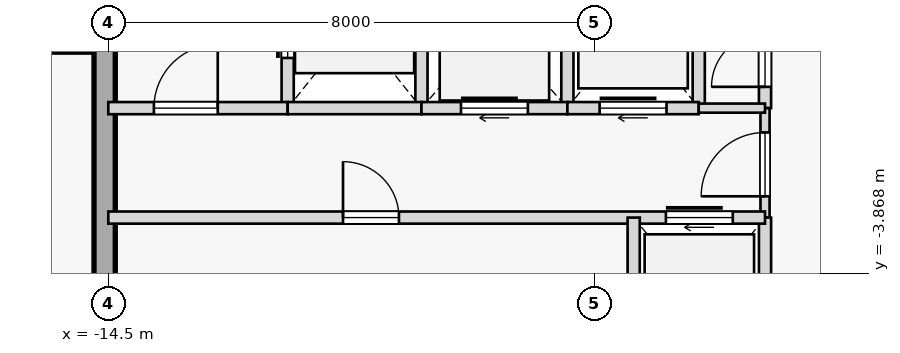
"""IFC4 building model, lengths in metres.
Left out: names, types, materials, properties, quantities, classifications, styles, units other than length and angle.
Written with IfcOpenShell. Run it as: python <this file> out.ifc"""

import sys

from ifc_helpers import new_model, si_unit, direction, frame, frame_2d, origin, place, context, subcontext, project, spatial, rectangle, extrude, element, fill, save


model = new_model("IFC4")
c1 = context("Model", 3, precision=1e-05, world=origin(), true_north=direction((0.0, 1.0)))
c2 = subcontext(c1, "Body", "Model", "MODEL_VIEW")
j1 = project(units=[si_unit("LENGTHUNIT", "METRE"), si_unit("PLANEANGLEUNIT", "RADIAN")], contexts=[c1])
p1 = place(None, origin())
s1 = spatial("IfcSite", under=j1, at=p1, CompositionType="ELEMENT")
p2 = place(p1, origin())
s2 = spatial("IfcBuilding", under=s1, at=p2, CompositionType="ELEMENT")
p3 = place(p2, frame((0.0, 0.0, 268.9)))
s3 = spatial("IfcBuildingStorey", under=s2, at=p3, CompositionType="ELEMENT", Elevation=268.9)
p4 = place(p3, frame((-14.56, -5.425, 0.0), z_axis=(0.0, 0.0, 1.0), x_axis=(0.0, 1.0, 0.0)))
e1 = element("IfcWall", 1, at=p4, inside=s3, PredefinedType="SHEAR", context=c2, shape_type="SweptSolid", body=[
    extrude(rectangle(XDim=10.85, YDim=0.35, at=frame_2d((5.425, 0.0))), origin(), (0.0, 0.0, 1.0), 3.125),
])
p5 = place(p3, frame((-3.7, -1.15, 0.0), z_axis=(0.0, 0.0, 1.0), x_axis=(0.0, 1.0, 0.0)))
e2 = element("IfcWall", 2, at=p5, inside=s3, PredefinedType="STANDARD", context=c2, shape_type="SweptSolid", body=[
    extrude(rectangle(XDim=6.75, YDim=0.2, at=frame_2d((3.375, 0.0))), origin(), (0.0, 0.0, 1.0), 3.125),
])
p6 = place(p5, frame((0.35, 0.0, 0.0)))
e3 = element("IfcOpeningElement", 3, at=p6, cuts=e2, PredefinedType="OPENING", context=c2, shape_type="SweptSolid", body=[
    extrude(rectangle(XDim=0.88, YDim=2.15, at=frame_2d((0.44, 1.075))), frame((0.0, 0.11, 0.0), z_axis=(0.0, -1.0, 0.0), x_axis=(1.0, 0.0, 0.0)), (0.0, 0.0, 1.0), 0.22),
])
p7 = place(p5, frame((2.55, 0.0, 0.0)))
e4 = element("IfcOpeningElement", 4, at=p7, cuts=e2, PredefinedType="OPENING", context=c2, shape_type="SweptSolid", body=[
    extrude(rectangle(XDim=0.92, YDim=2.15, at=frame_2d((0.46, 1.075))), frame((0.0, 0.11, 0.0), z_axis=(0.0, -1.0, 0.0), x_axis=(1.0, 0.0, 0.0)), (0.0, 0.0, 1.0), 0.22),
])
p8 = place(p5, frame((4.22, 0.0, 0.0)))
e5 = element("IfcOpeningElement", 5, at=p8, cuts=e2, PredefinedType="OPENING", context=c2, shape_type="SweptSolid", body=[
    extrude(rectangle(XDim=0.88, YDim=2.15, at=frame_2d((0.44, 1.075))), frame((0.0, 0.11, 0.0), z_axis=(0.0, -1.0, 0.0), x_axis=(1.0, 0.0, 0.0)), (0.0, 0.0, 1.0), 0.22),
])
p9 = place(p3, frame((-3.7, -2.95, 0.0), z_axis=(0.0, 0.0, 1.0), x_axis=(0.0, 1.0, 0.0)))
e6 = element("IfcWall", 6, at=p9, inside=s3, PredefinedType="PARTITIONING", context=c2, shape_type="SweptSolid", body=[
    extrude(rectangle(XDim=1.8, YDim=0.15, at=frame_2d((0.9, 0.0))), origin(), (0.0, 0.0, 1.0), 3.125),
])
p10 = place(p9, frame((0.35, 0.0, 0.0)))
e7 = element("IfcOpeningElement", 7, at=p10, cuts=e6, PredefinedType="OPENING", context=c2, shape_type="SweptSolid", body=[
    extrude(rectangle(XDim=1.05, YDim=2.18, at=frame_2d((0.525, 1.09))), frame((0.0, 0.085, 0.0), z_axis=(0.0, -1.0, 0.0), x_axis=(1.0, 0.0, 0.0)), (0.0, 0.0, 1.0), 0.17),
])
p11 = place(p3, frame((-3.7, -5.6, 0.0), z_axis=(0.0, 0.0, 1.0), x_axis=(0.0, 1.0, 0.0)))
e8 = element("IfcWall", 8, at=p11, inside=s3, PredefinedType="STANDARD", context=c2, shape_type="SweptSolid", body=[
    extrude(rectangle(XDim=2.65, YDim=0.2, at=frame_2d((1.325, 0.0))), origin(), (0.0, 0.0, 1.0), 3.125),
])
p12 = place(p3, frame((-11.55, -1.15, 0.0), z_axis=(0.0, 0.0, 1.0), x_axis=(0.0, 1.0, 0.0)))
e9 = element("IfcWall", 9, at=p12, inside=s3, PredefinedType="STANDARD", context=c2, shape_type="SweptSolid", body=[
    extrude(rectangle(XDim=2.75, YDim=0.2, at=frame_2d((1.375, 0.0))), origin(), (0.0, 0.0, 1.0), 3.125),
])
p13 = place(p12, frame((0.825, 0.0, 0.0)))
e10 = element("IfcOpeningElement", 10, at=p13, cuts=e9, PredefinedType="OPENING", context=c2, shape_type="SweptSolid", body=[
    extrude(rectangle(XDim=1.1, YDim=2.15, at=frame_2d((0.55, 1.075))), frame((0.0, 0.11, 0.0), z_axis=(0.0, -1.0, 0.0), x_axis=(1.0, 0.0, 0.0)), (0.0, 0.0, 1.0), 0.22),
])
p14 = place(p3, frame((-9.35, -1.15, 0.0), z_axis=(0.0, 0.0, 1.0), x_axis=(0.0, 1.0, 0.0)))
e11 = element("IfcWall", 11, at=p14, inside=s3, PredefinedType="STANDARD", context=c2, shape_type="SweptSolid", body=[
    extrude(rectangle(XDim=2.75, YDim=0.2, at=frame_2d((1.375, 0.0))), origin(), (0.0, 0.0, 1.0), 3.125),
])
p15 = place(p3, frame((-14.5, -1.15, 0.0), z_axis=(0.0, 0.0, 1.0), x_axis=(1.0, 0.0, 0.0)))
e12 = element("IfcWall", 12, at=p15, inside=s3, PredefinedType="STANDARD", context=c2, shape_type="SweptSolid", body=[
    extrude(rectangle(XDim=2.95, YDim=0.2, at=frame_2d((1.475, 0.0))), origin(), (0.0, 0.0, 1.0), 3.125),
])
p16 = place(p15, frame((0.75, 0.0, 0.0)))
e13 = element("IfcOpeningElement", 13, at=p16, cuts=e12, PredefinedType="OPENING", context=c2, shape_type="SweptSolid", body=[
    extrude(rectangle(XDim=1.05, YDim=2.18, at=frame_2d((0.525, 1.09))), frame((0.0, 0.11, 0.0), z_axis=(0.0, -1.0, 0.0), x_axis=(1.0, 0.0, 0.0)), (0.0, 0.0, 1.0), 0.22),
])
p17 = place(p3, frame((-11.55, -1.15, 0.0), z_axis=(0.0, 0.0, 1.0), x_axis=(1.0, 0.0, 0.0)))
e14 = element("IfcWall", 14, at=p17, inside=s3, PredefinedType="STANDARD", context=c2, shape_type="SweptSolid", body=[
    extrude(rectangle(XDim=2.2, YDim=0.2, at=frame_2d((1.1, 0.0))), origin(), (0.0, 0.0, 1.0), 3.125),
])
p18 = place(p3, frame((-6.95, -1.15, 0.0), z_axis=(0.0, 0.0, 1.0), x_axis=(0.0, 1.0, 0.0)))
e15 = element("IfcWall", 15, at=p18, inside=s3, PredefinedType="STANDARD", context=c2, shape_type="SweptSolid", body=[
    extrude(rectangle(XDim=2.75, YDim=0.2, at=frame_2d((1.375, 0.0))), origin(), (0.0, 0.0, 1.0), 3.125),
])
p19 = place(p3, frame((-9.35, -1.15, 0.0), z_axis=(0.0, 0.0, 1.0), x_axis=(1.0, 0.0, 0.0)))
e16 = element("IfcWall", 16, at=p19, inside=s3, PredefinedType="STANDARD", context=c2, shape_type="SweptSolid", body=[
    extrude(rectangle(XDim=2.4, YDim=0.2, at=frame_2d((1.2, 0.0))), origin(), (0.0, 0.0, 1.0), 3.125),
])
p20 = place(p19, frame((0.65, 0.0, 0.0)))
e17 = element("IfcOpeningElement", 17, at=p20, cuts=e16, PredefinedType="OPENING", context=c2, shape_type="SweptSolid", body=[
    extrude(rectangle(XDim=1.1, YDim=2.15, at=frame_2d((0.55, 1.075))), frame((0.0, 0.11, 0.0), z_axis=(0.0, -1.0, 0.0), x_axis=(1.0, 0.0, 0.0)), (0.0, 0.0, 1.0), 0.22),
])
p21 = place(p3, frame((-4.79, -1.15, 0.0), z_axis=(0.0, 0.0, 1.0), x_axis=(0.0, 1.0, 0.0)))
e18 = element("IfcWall", 18, at=p21, inside=s3, PredefinedType="STANDARD", context=c2, shape_type="SweptSolid", body=[
    extrude(rectangle(XDim=2.75, YDim=0.2, at=frame_2d((1.375, 0.0))), origin(), (0.0, 0.0, 1.0), 3.125),
])
p22 = place(p3, frame((-6.95, -1.15, 0.0), z_axis=(0.0, 0.0, 1.0), x_axis=(1.0, 0.0, 0.0)))
e19 = element("IfcWall", 19, at=p22, inside=s3, PredefinedType="STANDARD", context=c2, shape_type="SweptSolid", body=[
    extrude(rectangle(XDim=2.16, YDim=0.2, at=frame_2d((1.08, 0.0))), origin(), (0.0, 0.0, 1.0), 3.125),
])
p23 = place(p22, frame((0.53, 0.0, 0.0)))
e20 = element("IfcOpeningElement", 20, at=p23, cuts=e19, PredefinedType="OPENING", context=c2, shape_type="SweptSolid", body=[
    extrude(rectangle(XDim=1.1, YDim=2.15, at=frame_2d((0.55, 1.075))), frame((0.0, 0.11, 0.0), z_axis=(0.0, -1.0, 0.0), x_axis=(1.0, 0.0, 0.0)), (0.0, 0.0, 1.0), 0.22),
])
p24 = place(p3, frame((-4.79, -1.15, 0.0), z_axis=(0.0, 0.0, 1.0), x_axis=(1.0, 0.0, 0.0)))
e21 = element("IfcWall", 21, at=p24, inside=s3, PredefinedType="PARTITIONING", context=c2, shape_type="SweptSolid", body=[
    extrude(rectangle(XDim=1.09, YDim=0.15, at=frame_2d((0.545, 0.0))), origin(), (0.0, 0.0, 1.0), 3.125),
])
p25 = place(p3, frame((-14.5, -2.95, 0.0), z_axis=(0.0, 0.0, 1.0), x_axis=(1.0, 0.0, 0.0)))
e22 = element("IfcWall", 22, at=p25, inside=s3, PredefinedType="STANDARD", context=c2, shape_type="SweptSolid", body=[
    extrude(rectangle(XDim=10.8, YDim=0.2, at=frame_2d((5.4, 0.0))), origin(), (0.0, 0.0, 1.0), 3.125),
])
p26 = place(p25, frame((9.17, 0.0, 0.0)))
e23 = element("IfcOpeningElement", 23, at=p26, cuts=e22, PredefinedType="OPENING", context=c2, shape_type="SweptSolid", body=[
    extrude(rectangle(XDim=1.1, YDim=2.15, at=frame_2d((0.55, 1.075))), frame((0.0, 0.11, 0.0), z_axis=(0.0, -1.0, 0.0), x_axis=(1.0, 0.0, 0.0)), (0.0, 0.0, 1.0), 0.22),
])
p27 = place(p25, frame((3.86, 0.0, 0.0)))
e24 = element("IfcOpeningElement", 24, at=p27, cuts=e22, PredefinedType="OPENING", context=c2, shape_type="SweptSolid", body=[
    extrude(rectangle(XDim=0.92, YDim=2.15, at=frame_2d((0.46, 1.075))), frame((0.0, 0.11, 0.0), z_axis=(0.0, -1.0, 0.0), x_axis=(1.0, 0.0, 0.0)), (0.0, 0.0, 1.0), 0.22),
])
p28 = place(p3, frame((-5.86, -5.6, 0.0), z_axis=(0.0, 0.0, 1.0), x_axis=(0.0, 1.0, 0.0)))
e25 = element("IfcWall", 25, at=p28, inside=s3, PredefinedType="STANDARD", context=c2, shape_type="SweptSolid", body=[
    extrude(rectangle(XDim=2.65, YDim=0.2, at=frame_2d((1.325, 0.0))), origin(), (0.0, 0.0, 1.0), 3.125),
])
p29 = place(p16, origin())
e26 = element("IfcDoor", 26, at=p29, inside=s3, OperationType="SINGLE_SWING_RIGHT", PredefinedType="DOOR", context=c2, shape_type="SweptSolid", body=[
    extrude(rectangle(XDim=1.05, YDim=2.18, at=frame_2d((0.525, 1.09))), frame((0.0, 0.025, 0.0), z_axis=(0.0, -1.0, 0.0), x_axis=(1.0, 0.0, 0.0)), (0.0, 0.0, 1.0), 0.05),
])
fill(e13, e26)
p30 = place(p10, origin())
e27 = element("IfcDoor", 27, at=p30, inside=s3, OperationType="SINGLE_SWING_LEFT", PredefinedType="DOOR", context=c2, shape_type="SweptSolid", body=[
    extrude(rectangle(XDim=1.05, YDim=2.18, at=frame_2d((0.525, 1.09))), frame((0.0, 0.025, 0.0), z_axis=(0.0, -1.0, 0.0), x_axis=(1.0, 0.0, 0.0)), (0.0, 0.0, 1.0), 0.05),
])
fill(e7, e27)
p31 = place(p13, origin())
e28 = element("IfcDoor", 28, at=p31, inside=s3, OperationType="SLIDING_TO_RIGHT", PredefinedType="DOOR", context=c2, shape_type="SweptSolid", body=[
    extrude(rectangle(XDim=1.1, YDim=2.15, at=frame_2d((0.55, 1.075))), frame((0.0, 0.025, 0.0), z_axis=(0.0, -1.0, 0.0), x_axis=(1.0, 0.0, 0.0)), (0.0, 0.0, 1.0), 0.05),
])
fill(e10, e28)
p32 = place(p20, origin())
e29 = element("IfcDoor", 29, at=p32, inside=s3, OperationType="SLIDING_TO_RIGHT", PredefinedType="DOOR", context=c2, shape_type="SweptSolid", body=[
    extrude(rectangle(XDim=1.1, YDim=2.15, at=frame_2d((0.55, 1.075))), frame((0.0, 0.025, 0.0), z_axis=(0.0, -1.0, 0.0), x_axis=(1.0, 0.0, 0.0)), (0.0, 0.0, 1.0), 0.05),
])
fill(e17, e29)
p33 = place(p23, origin())
e30 = element("IfcDoor", 30, at=p33, inside=s3, OperationType="SLIDING_TO_RIGHT", PredefinedType="DOOR", context=c2, shape_type="SweptSolid", body=[
    extrude(rectangle(XDim=1.1, YDim=2.15, at=frame_2d((0.55, 1.075))), frame((0.0, 0.025, 0.0), z_axis=(0.0, -1.0, 0.0), x_axis=(1.0, 0.0, 0.0)), (0.0, 0.0, 1.0), 0.05),
])
fill(e20, e30)
p34 = place(p26, origin())
e31 = element("IfcDoor", 31, at=p34, inside=s3, OperationType="SLIDING_TO_RIGHT", PredefinedType="DOOR", context=c2, shape_type="SweptSolid", body=[
    extrude(rectangle(XDim=1.1, YDim=2.15, at=frame_2d((0.55, 1.075))), frame((0.0, 0.025, 0.0), z_axis=(0.0, -1.0, 0.0), x_axis=(1.0, 0.0, 0.0)), (0.0, 0.0, 1.0), 0.05),
])
fill(e23, e31)
p35 = place(p27, origin())
e32 = element("IfcDoor", 32, at=p35, inside=s3, OperationType="SINGLE_SWING_LEFT", PredefinedType="DOOR", context=c2, shape_type="SweptSolid", body=[
    extrude(rectangle(XDim=0.92, YDim=2.15, at=frame_2d((0.46, 1.075))), frame((0.0, 0.025, 0.0), z_axis=(0.0, -1.0, 0.0), x_axis=(1.0, 0.0, 0.0)), (0.0, 0.0, 1.0), 0.05),
])
fill(e24, e32)
p36 = place(p6, origin())
e33 = element("IfcDoor", 33, at=p36, inside=s3, OperationType="SINGLE_SWING_LEFT", PredefinedType="DOOR", context=c2, shape_type="SweptSolid", body=[
    extrude(rectangle(XDim=0.88, YDim=2.15, at=frame_2d((0.44, 1.075))), frame((0.0, 0.025, 0.0), z_axis=(0.0, -1.0, 0.0), x_axis=(1.0, 0.0, 0.0)), (0.0, 0.0, 1.0), 0.05),
])
fill(e3, e33)
save(model, sys.argv[1])
